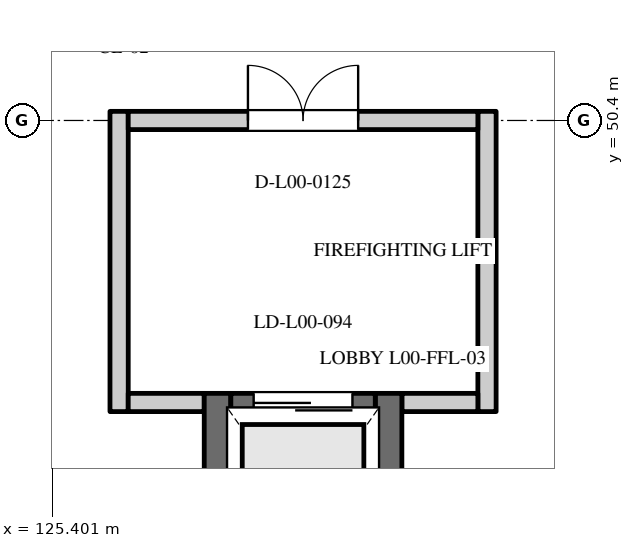
"""IFC4 building model, lengths in metres.
Left out: names, types, materials, properties, quantities, classifications, styles, units other than length and angle.
Written with IfcOpenShell. Run it as: python <this file> out.ifc"""

import sys

from ifc_helpers import new_model, si_unit, direction, frame, frame_2d, origin, place, context, subcontext, project, spatial, rectangle, extrude, element, fill, save


model = new_model("IFC4")
c1 = context("Model", 3, precision=1e-05, world=origin(), true_north=direction((0.0, 1.0)))
c2 = subcontext(c1, "Body", "Model", "MODEL_VIEW")
j1 = project(units=[si_unit("LENGTHUNIT", "METRE"), si_unit("PLANEANGLEUNIT", "RADIAN")], contexts=[c1])
p1 = place(None, origin())
s1 = spatial("IfcSite", under=j1, at=p1, CompositionType="ELEMENT")
p2 = place(p1, origin())
s2 = spatial("IfcBuilding", under=s1, at=p2, CompositionType="ELEMENT")
p3 = place(p2, origin())
s3 = spatial("IfcBuildingStorey", under=s2, at=p3, CompositionType="ELEMENT", Elevation=0.0)
for number, where, z_axis, x_axis in (
    (1, (127.575, 43.06, 0.0), (0.0, 0.0, 1.0), (0.0, 1.0, 0.0)),
    (2, (129.825, 43.06, 0.0), (0.0, 0.0, 1.0), (0.0, 1.0, 0.0)),
):
    element("IfcWall", number, at=place(p3, frame(where, z_axis=z_axis, x_axis=x_axis)), inside=s3, PredefinedType="SHEAR", context=c2, shape_type="SweptSolid", body=[
        extrude(rectangle(XDim=3.75, YDim=0.35, at=frame_2d((1.875, 0.0))), origin(), (0.0, 0.0, 1.0), 4.8),
    ])
p4 = place(p3, frame((127.75, 46.635, 0.0), z_axis=(0.0, 0.0, 1.0), x_axis=(1.0, 0.0, 0.0)))
e3 = element("IfcWall", 3, at=p4, inside=s3, PredefinedType="SHEAR", context=c2, shape_type="SweptSolid", body=[
    extrude(rectangle(XDim=1.9, YDim=0.35, at=frame_2d((0.95, 0.0))), origin(), (0.0, 0.0, 1.0), 4.45),
])
p5 = place(p4, frame((0.3, 0.0, 0.0)))
e4 = element("IfcOpeningElement", 4, at=p5, cuts=e3, PredefinedType="OPENING", context=c2, shape_type="SweptSolid", body=[
    extrude(rectangle(XDim=1.3, YDim=2.2, at=frame_2d((0.65, 1.1))), frame((0.0, 0.187, 0.0), z_axis=(0.0, -1.0, 0.0), x_axis=(1.0, 0.0, 0.0)), (0.0, 0.0, 1.0), 0.374),
])
for number, where, z_axis, x_axis in (
    (5, (126.28, 46.57, 0.0), (0.0, 0.0, 1.0), (0.0, 1.0, 0.0)),
    (6, (131.12, 46.57, 0.0), (0.0, 0.0, 1.0), (0.0, 1.0, 0.0)),
):
    element("IfcWall", number, at=place(p3, frame(where, z_axis=z_axis, x_axis=x_axis)), inside=s3, PredefinedType="STANDARD", context=c2, shape_type="SweptSolid", body=[
        extrude(rectangle(XDim=3.95, YDim=0.24, at=frame_2d((1.975, 0.0))), origin(), (0.0, 0.0, 1.0), 3.7),
    ])
for number, where, z_axis, x_axis in (
    (7, (126.4, 46.69, 0.0), (0.0, 0.0, 1.0), (1.0, 0.0, 0.0)),
    (8, (130.0, 46.69, 0.0), (0.0, 0.0, 1.0), (1.0, 0.0, 0.0)),
):
    element("IfcWall", number, at=place(p3, frame(where, z_axis=z_axis, x_axis=x_axis)), inside=s3, PredefinedType="STANDARD", context=c2, shape_type="SweptSolid", body=[
        extrude(rectangle(XDim=1.0, YDim=0.24, at=frame_2d((0.5, 0.0))), origin(), (0.0, 0.0, 1.0), 3.7),
    ])
p6 = place(p3, frame((126.4, 50.4, 0.0), z_axis=(0.0, 0.0, 1.0), x_axis=(1.0, 0.0, 0.0)))
e9 = element("IfcWall", 9, at=p6, inside=s3, PredefinedType="STANDARD", context=c2, shape_type="SweptSolid", body=[
    extrude(rectangle(XDim=4.6, YDim=0.24, at=frame_2d((2.3, 0.0))), origin(), (0.0, 0.0, 1.0), 3.7),
])
p7 = place(p6, frame((1.575, 0.0, 0.0)))
e10 = element("IfcOpeningElement", 10, at=p7, cuts=e9, PredefinedType="OPENING", context=c2, shape_type="SweptSolid", body=[
    extrude(rectangle(XDim=1.45, YDim=2.2, at=frame_2d((0.725, 1.1))), frame((0.0, 0.132, 0.0), z_axis=(0.0, -1.0, 0.0), x_axis=(1.0, 0.0, 0.0)), (0.0, 0.0, 1.0), 0.264),
])
p8 = place(p5, origin())
e11 = element("IfcDoor", 11, at=p8, inside=s3, OperationType="SLIDING_TO_LEFT", PredefinedType="DOOR", context=c2, shape_type="SweptSolid", body=[
    extrude(rectangle(XDim=1.3, YDim=2.2, at=frame_2d((0.65, 1.1))), frame((0.0, 0.025, 0.0), z_axis=(0.0, -1.0, 0.0), x_axis=(1.0, 0.0, 0.0)), (0.0, 0.0, 1.0), 0.05),
])
fill(e4, e11)
p9 = place(p7, origin())
e12 = element("IfcDoor", 12, at=p9, inside=s3, OperationType="DOUBLE_DOOR_SINGLE_SWING", PredefinedType="DOOR", context=c2, shape_type="SweptSolid", body=[
    extrude(rectangle(XDim=1.45, YDim=2.2, at=frame_2d((0.725, 1.1))), frame((0.0, 0.025, 0.0), z_axis=(0.0, -1.0, 0.0), x_axis=(1.0, 0.0, 0.0)), (0.0, 0.0, 1.0), 0.05),
])
fill(e10, e12)
save(model, sys.argv[1])
